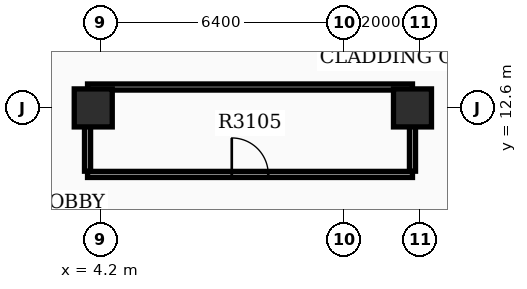
"""IFC4 building model, lengths in metres.
Left out: names, types, materials, properties, quantities, classifications, styles, units other than length and angle.
Written with IfcOpenShell. Run it as: python <this file> out.ifc"""

import sys

from ifc_helpers import new_model, si_unit, direction, frame, frame_2d, origin, origin_2d, place, context, subcontext, project, spatial, rectangle, extrude, element, fill, save


model = new_model("IFC4")
c1 = context("Model", 3, precision=1e-05, world=origin(), true_north=direction((0.0, 1.0)))
c2 = subcontext(c1, "Body", "Model", "MODEL_VIEW")
j1 = project(units=[si_unit("LENGTHUNIT", "METRE"), si_unit("PLANEANGLEUNIT", "RADIAN")], contexts=[c1])
p1 = place(None, origin())
s1 = spatial("IfcSite", under=j1, at=p1, CompositionType="ELEMENT")
p2 = place(p1, origin())
s2 = spatial("IfcBuilding", under=s1, at=p2, CompositionType="ELEMENT")
p3 = place(p2, frame((0.0, 0.0, 196.8)))
s3 = spatial("IfcBuildingStorey", under=s2, at=p3, CompositionType="ELEMENT", Elevation=196.8)
for number, where, z_axis, x_axis in (
    (1, (12.4, 12.6, 0.0), (0.0, 0.0, 1.0), (1.0, 0.0, 0.0)),
    (2, (4.0, 12.6, 0.0), (0.0, 0.0, 1.0), (1.0, 0.0, 0.0)),
):
    element("IfcColumn", number, at=place(p3, frame(where, z_axis=z_axis, x_axis=x_axis)), inside=s3, PredefinedType="COLUMN", context=c2, shape_type="SweptSolid", body=[
        extrude(rectangle(XDim=1.0, YDim=1.0, at=origin_2d()), origin(), (0.0, 0.0, 1.0), 4.5),
    ])
p4 = place(p3, frame((14.017, 13.976, 0.0), z_axis=(0.0, 0.0, 1.0), x_axis=(-0.998883930236, -0.047232339719, 0.0)))
e3 = element("IfcWall", 3, at=p4, inside=s3, PredefinedType="STANDARD", context=c2, shape_type="SweptSolid", body=[
    extrude(rectangle(XDim=1.22, YDim=0.28, at=frame_2d((0.61, 0.0))), origin(), (0.0, 0.0, 1.0), 3.38),
])
p5 = place(p3, frame((12.652, 14.052, 0.0), z_axis=(0.0, 0.0, 1.0), x_axis=(-0.047039284441, 0.99889304018, 0.0)))
e4 = element("IfcWall", 4, at=p5, inside=s3, PredefinedType="STANDARD", context=c2, shape_type="SweptSolid", body=[
    extrude(rectangle(XDim=1.5, YDim=0.28, at=frame_2d((0.75, 0.0))), origin(), (0.0, 0.0, 1.0), 3.38),
])
p6 = place(p3, frame((3.85, 10.85, 0.0), z_axis=(0.0, 0.0, 1.0), x_axis=(1.0, 0.0, 0.0)))
e5 = element("IfcWall", 5, at=p6, inside=s3, PredefinedType="PARTITIONING", context=c2, shape_type="SweptSolid", body=[
    extrude(rectangle(XDim=8.55, YDim=0.16, at=frame_2d((4.275, 0.0))), origin(), (0.0, 0.0, 1.0), 3.37),
])
p7 = place(p6, frame((3.795, 0.0, 0.0)))
e6 = element("IfcOpeningElement", 6, at=p7, cuts=e5, PredefinedType="OPENING", context=c2, shape_type="SweptSolid", body=[
    extrude(rectangle(XDim=0.96, YDim=2.15, at=frame_2d((0.48, 1.075))), frame((0.0, 0.09, 0.0), z_axis=(0.0, -1.0, 0.0), x_axis=(1.0, 0.0, 0.0)), (0.0, 0.0, 1.0), 0.18),
])
p8 = place(p3, frame((3.85, 13.15, 0.0), z_axis=(0.0, 0.0, 1.0), x_axis=(1.0, 0.0, 0.0)))
e7 = element("IfcWall", 7, at=p8, inside=s3, PredefinedType="PARTITIONING", context=c2, shape_type="SweptSolid", body=[
    extrude(rectangle(XDim=8.55, YDim=0.16, at=frame_2d((4.275, 0.0))), origin(), (0.0, 0.0, 1.0), 3.37),
])
for number, where, z_axis, x_axis in (
    (8, (3.85, 10.935, 0.0), (0.0, 0.0, 1.0), (0.0, 1.0, 0.0)),
    (9, (12.4, 10.935, 0.0), (0.0, 0.0, 1.0), (0.0, 1.0, 0.0)),
):
    element("IfcWall", number, at=place(p3, frame(where, z_axis=z_axis, x_axis=x_axis)), inside=s3, PredefinedType="PARTITIONING", context=c2, shape_type="SweptSolid", body=[
        extrude(rectangle(XDim=2.13, YDim=0.16, at=frame_2d((1.065, 0.0))), origin(), (0.0, 0.0, 1.0), 3.37),
    ])
p9 = place(p7, origin())
e10 = element("IfcDoor", 10, at=p9, inside=s3, OperationType="SINGLE_SWING_LEFT", PredefinedType="DOOR", context=c2, shape_type="SweptSolid", body=[
    extrude(rectangle(XDim=0.96, YDim=2.15, at=frame_2d((0.48, 1.075))), frame((0.0, 0.025, 0.0), z_axis=(0.0, -1.0, 0.0), x_axis=(1.0, 0.0, 0.0)), (0.0, 0.0, 1.0), 0.05),
])
fill(e6, e10)
save(model, sys.argv[1])
